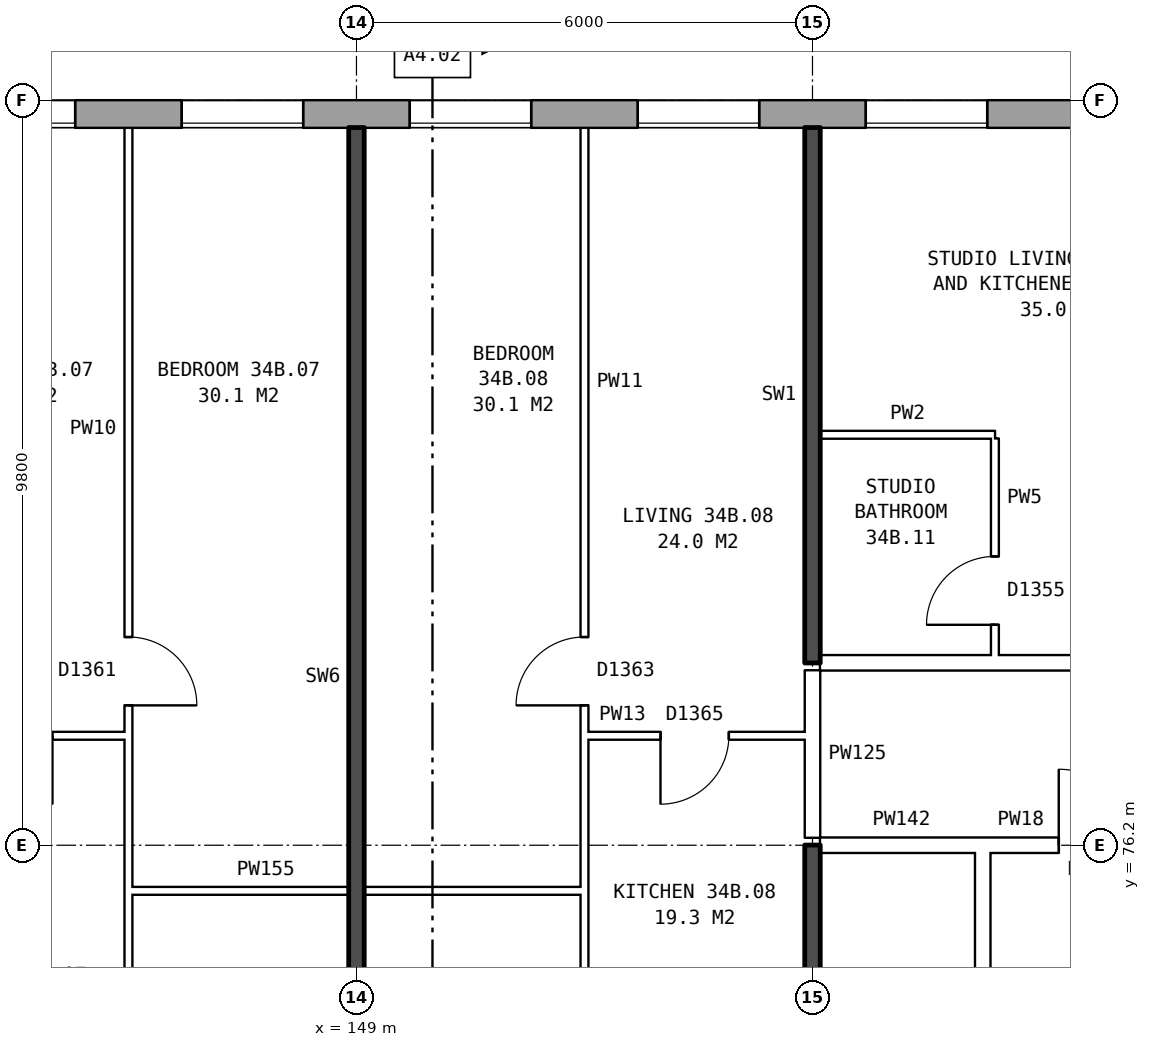
"""IFC4 building model, lengths in metres.
Left out: names, types, materials, properties, quantities, classifications, styles, units other than length and angle.
Written with IfcOpenShell. Run it as: python <this file> out.ifc"""

import sys

from ifc_helpers import new_model, si_unit, direction, frame, frame_2d, origin, place, context, subcontext, project, spatial, rectangle, extrude, element, fill, save


model = new_model("IFC4")
c1 = context("Model", 3, precision=1e-05, world=origin(), true_north=direction((0.0, 1.0)))
c2 = subcontext(c1, "Body", "Model", "MODEL_VIEW")
j1 = project(units=[si_unit("LENGTHUNIT", "METRE"), si_unit("PLANEANGLEUNIT", "RADIAN")], contexts=[c1])
p1 = place(None, origin())
s1 = spatial("IfcSite", under=j1, at=p1, CompositionType="ELEMENT")
p2 = place(p1, origin())
s2 = spatial("IfcBuilding", under=s1, at=p2, CompositionType="ELEMENT")
p3 = place(p2, frame((0.0, 0.0, 123.7)))
s3 = spatial("IfcBuildingStorey", under=s2, at=p3, CompositionType="ELEMENT", Elevation=123.7)
p4 = place(p3, frame((169.675, 85.82, 0.0), z_axis=(0.0, 0.0, 1.0), x_axis=(-1.0, 0.0, 0.0)))
e1 = element("IfcWall", 1, at=p4, inside=s3, PredefinedType="STANDARD", context=c2, shape_type="SweptSolid", body=[
    extrude(rectangle(XDim=35.601, YDim=0.36, at=frame_2d((17.8, 0.0))), origin(), (0.0, 0.0, 1.0), 2.85),
])
p5 = place(p4, frame((0.3, 0.0, 0.8)))
e2 = element("IfcOpeningElement", 2, at=p5, cuts=e1, PredefinedType="OPENING", context=c2, shape_type="SweptSolid", body=[
    extrude(rectangle(XDim=0.8, YDim=1.8, at=frame_2d((0.4, 0.9))), frame((0.0, 0.19, 0.0), z_axis=(0.0, -1.0, 0.0), x_axis=(1.0, 0.0, 0.0)), (0.0, 0.0, 1.0), 0.38),
])
p6 = place(p4, frame((3.125, 0.0, 0.8)))
e3 = element("IfcOpeningElement", 3, at=p6, cuts=e1, PredefinedType="OPENING", context=c2, shape_type="SweptSolid", body=[
    extrude(rectangle(XDim=0.8, YDim=0.9, at=frame_2d((0.4, 0.45))), frame((0.0, 0.19, 0.0), z_axis=(0.0, -1.0, 0.0), x_axis=(1.0, 0.0, 0.0)), (0.0, 0.0, 1.0), 0.38),
])
p7 = place(p4, frame((6.375, 0.0, 0.8)))
e4 = element("IfcOpeningElement", 4, at=p7, cuts=e1, PredefinedType="OPENING", context=c2, shape_type="SweptSolid", body=[
    extrude(rectangle(XDim=1.6, YDim=1.8, at=frame_2d((0.8, 0.9))), frame((0.0, 0.19, 0.0), z_axis=(0.0, -1.0, 0.0), x_axis=(1.0, 0.0, 0.0)), (0.0, 0.0, 1.0), 0.38),
])
p8 = place(p4, frame((9.375, 0.0, 0.8)))
e5 = element("IfcOpeningElement", 5, at=p8, cuts=e1, PredefinedType="OPENING", context=c2, shape_type="SweptSolid", body=[
    extrude(rectangle(XDim=1.6, YDim=1.8, at=frame_2d((0.8, 0.9))), frame((0.0, 0.19, 0.0), z_axis=(0.0, -1.0, 0.0), x_axis=(1.0, 0.0, 0.0)), (0.0, 0.0, 1.0), 0.38),
])
p9 = place(p4, frame((12.375, 0.0, 0.8)))
e6 = element("IfcOpeningElement", 6, at=p9, cuts=e1, PredefinedType="OPENING", context=c2, shape_type="SweptSolid", body=[
    extrude(rectangle(XDim=1.6, YDim=1.8, at=frame_2d((0.8, 0.9))), frame((0.0, 0.19, 0.0), z_axis=(0.0, -1.0, 0.0), x_axis=(1.0, 0.0, 0.0)), (0.0, 0.0, 1.0), 0.38),
])
p10 = place(p4, frame((15.375, 0.0, 0.8)))
e7 = element("IfcOpeningElement", 7, at=p10, cuts=e1, PredefinedType="OPENING", context=c2, shape_type="SweptSolid", body=[
    extrude(rectangle(XDim=1.6, YDim=1.8, at=frame_2d((0.8, 0.9))), frame((0.0, 0.19, 0.0), z_axis=(0.0, -1.0, 0.0), x_axis=(1.0, 0.0, 0.0)), (0.0, 0.0, 1.0), 0.38),
])
p11 = place(p4, frame((18.375, 0.0, 0.8)))
e8 = element("IfcOpeningElement", 8, at=p11, cuts=e1, PredefinedType="OPENING", context=c2, shape_type="SweptSolid", body=[
    extrude(rectangle(XDim=1.6, YDim=1.8, at=frame_2d((0.8, 0.9))), frame((0.0, 0.19, 0.0), z_axis=(0.0, -1.0, 0.0), x_axis=(1.0, 0.0, 0.0)), (0.0, 0.0, 1.0), 0.38),
])
p12 = place(p4, frame((21.375, 0.0, 0.8)))
e9 = element("IfcOpeningElement", 9, at=p12, cuts=e1, PredefinedType="OPENING", context=c2, shape_type="SweptSolid", body=[
    extrude(rectangle(XDim=1.6, YDim=1.8, at=frame_2d((0.8, 0.9))), frame((0.0, 0.19, 0.0), z_axis=(0.0, -1.0, 0.0), x_axis=(1.0, 0.0, 0.0)), (0.0, 0.0, 1.0), 0.38),
])
p13 = place(p4, frame((24.375, 0.0, 0.8)))
e10 = element("IfcOpeningElement", 10, at=p13, cuts=e1, PredefinedType="OPENING", context=c2, shape_type="SweptSolid", body=[
    extrude(rectangle(XDim=1.6, YDim=1.8, at=frame_2d((0.8, 0.9))), frame((0.0, 0.19, 0.0), z_axis=(0.0, -1.0, 0.0), x_axis=(1.0, 0.0, 0.0)), (0.0, 0.0, 1.0), 0.38),
])
p14 = place(p4, frame((27.375, 0.0, 0.8)))
e11 = element("IfcOpeningElement", 11, at=p14, cuts=e1, PredefinedType="OPENING", context=c2, shape_type="SweptSolid", body=[
    extrude(rectangle(XDim=1.6, YDim=1.8, at=frame_2d((0.8, 0.9))), frame((0.0, 0.19, 0.0), z_axis=(0.0, -1.0, 0.0), x_axis=(1.0, 0.0, 0.0)), (0.0, 0.0, 1.0), 0.38),
])
p15 = place(p4, frame((29.275, 0.0, 0.8)))
e12 = element("IfcOpeningElement", 12, at=p15, cuts=e1, PredefinedType="OPENING", context=c2, shape_type="SweptSolid", body=[
    extrude(rectangle(XDim=1.4, YDim=1.8, at=frame_2d((0.7, 0.9))), frame((0.0, 0.19, 0.0), z_axis=(0.0, -1.0, 0.0), x_axis=(1.0, 0.0, 0.0)), (0.0, 0.0, 1.0), 0.38),
])
p16 = place(p4, frame((33.525, 0.0, 1.7)))
e13 = element("IfcOpeningElement", 13, at=p16, cuts=e1, PredefinedType="OPENING", context=c2, shape_type="SweptSolid", body=[
    extrude(rectangle(XDim=0.6, YDim=0.9, at=frame_2d((0.3, 0.45))), frame((0.0, 0.19, 0.0), z_axis=(0.0, -1.0, 0.0), x_axis=(1.0, 0.0, 0.0)), (0.0, 0.0, 1.0), 0.38),
])
p17 = place(p4, frame((1.4, 0.0, 1.6)))
e14 = element("IfcOpeningElement", 14, at=p17, cuts=e1, PredefinedType="OPENING", context=c2, shape_type="SweptSolid", body=[
    extrude(rectangle(XDim=0.6, YDim=0.9, at=frame_2d((0.3, 0.45))), frame((0.0, 0.19, 0.0), z_axis=(0.0, -1.0, 0.0), x_axis=(1.0, 0.0, 0.0)), (0.0, 0.0, 1.0), 0.38),
])
p18 = place(p4, frame((4.225, 0.0, 0.8)))
e15 = element("IfcOpeningElement", 15, at=p18, cuts=e1, PredefinedType="OPENING", context=c2, shape_type="SweptSolid", body=[
    extrude(rectangle(XDim=1.6, YDim=1.8, at=frame_2d((0.8, 0.9))), frame((0.0, 0.19, 0.0), z_axis=(0.0, -1.0, 0.0), x_axis=(1.0, 0.0, 0.0)), (0.0, 0.0, 1.0), 0.38),
])
p19 = place(p4, frame((30.975, 0.0, 0.8)))
e16 = element("IfcOpeningElement", 16, at=p19, cuts=e1, PredefinedType="OPENING", context=c2, shape_type="SweptSolid", body=[
    extrude(rectangle(XDim=0.8, YDim=1.5, at=frame_2d((0.4, 0.75))), frame((0.0, 0.19, 0.0), z_axis=(0.0, -1.0, 0.0), x_axis=(1.0, 0.0, 0.0)), (0.0, 0.0, 1.0), 0.38),
])
p20 = place(p4, frame((34.425, 0.0, 0.8)))
e17 = element("IfcOpeningElement", 17, at=p20, cuts=e1, PredefinedType="OPENING", context=c2, shape_type="SweptSolid", body=[
    extrude(rectangle(XDim=0.8, YDim=1.8, at=frame_2d((0.4, 0.9))), frame((0.0, 0.19, 0.0), z_axis=(0.0, -1.0, 0.0), x_axis=(1.0, 0.0, 0.0)), (0.0, 0.0, 1.0), 0.38),
])
p21 = place(p3, frame((157.24, 63.9, 0.0), z_axis=(0.0, 0.0, 1.0), x_axis=(0.0, 1.0, 0.0)))
e18 = element("IfcWall", 18, at=p21, inside=s3, PredefinedType="PARTITIONING", context=c2, shape_type="SweptSolid", body=[
    extrude(rectangle(XDim=12.2, YDim=0.2, at=frame_2d((6.1, 0.0))), origin(), (0.0, 0.0, 1.0), 2.85),
])
p22 = place(p21, frame((5.1, 0.0, 0.0)))
e19 = element("IfcOpeningElement", 19, at=p22, cuts=e18, PredefinedType="OPENING", context=c2, shape_type="SweptSolid", body=[
    extrude(rectangle(XDim=2.0, YDim=2.1, at=frame_2d((1.0, 1.05))), frame((0.0, 0.11, 0.0), z_axis=(0.0, -1.0, 0.0), x_axis=(1.0, 0.0, 0.0)), (0.0, 0.0, 1.0), 0.22),
])
p23 = place(p3, frame((146.0, 75.6, 0.0), z_axis=(0.0, 0.0, 1.0), x_axis=(1.0, 0.0, 0.0)))
e20 = element("IfcWall", 20, at=p23, inside=s3, PredefinedType="PARTITIONING", context=c2, shape_type="SweptSolid", body=[
    extrude(rectangle(XDim=6.0, YDim=0.1, at=frame_2d((3.0, 0.0))), origin(), (0.0, 0.0, 1.0), 2.85),
])
p24 = place(p3, frame((155.1, 76.2, 0.0), z_axis=(0.0, 0.0, 1.0), x_axis=(1.0, 0.0, 0.0)))
e21 = element("IfcWall", 21, at=p24, inside=s3, PredefinedType="PARTITIONING", context=c2, shape_type="SweptSolid", body=[
    extrude(rectangle(XDim=2.14, YDim=0.2, at=frame_2d((1.07, 0.0))), origin(), (0.0, 0.0, 1.0), 2.85),
])
p25 = place(p3, frame((157.24, 76.2, 0.0), z_axis=(0.0, 0.0, 1.0), x_axis=(1.0, 0.0, 0.0)))
e22 = element("IfcWall", 22, at=p25, inside=s3, PredefinedType="PARTITIONING", context=c2, shape_type="SweptSolid", body=[
    extrude(rectangle(XDim=3.0, YDim=0.2, at=frame_2d((1.5, 0.0))), origin(), (0.0, 0.0, 1.0), 2.85),
])
p26 = place(p25, frame((1.0, 0.0, 0.0)))
e23 = element("IfcOpeningElement", 23, at=p26, cuts=e22, PredefinedType="OPENING", context=c2, shape_type="SweptSolid", body=[
    extrude(rectangle(XDim=1.0, YDim=2.1, at=frame_2d((0.5, 1.05))), frame((0.0, 0.11, 0.0), z_axis=(0.0, -1.0, 0.0), x_axis=(1.0, 0.0, 0.0)), (0.0, 0.0, 1.0), 0.22),
])
p27 = place(p3, frame((143.1, 77.64, 0.0), z_axis=(0.0, 0.0, 1.0), x_axis=(1.0, 0.0, 0.0)))
e24 = element("IfcWall", 24, at=p27, inside=s3, PredefinedType="PARTITIONING", context=c2, shape_type="SweptSolid", body=[
    extrude(rectangle(XDim=2.9, YDim=0.1, at=frame_2d((1.45, 0.0))), origin(), (0.0, 0.0, 1.0), 2.85),
])
p28 = place(p27, frame((1.0, 0.0, 0.0)))
e25 = element("IfcOpeningElement", 25, at=p28, cuts=e24, PredefinedType="OPENING", context=c2, shape_type="SweptSolid", body=[
    extrude(rectangle(XDim=0.9, YDim=2.1, at=frame_2d((0.45, 1.05))), frame((0.0, 0.06, 0.0), z_axis=(0.0, -1.0, 0.0), x_axis=(1.0, 0.0, 0.0)), (0.0, 0.0, 1.0), 0.12),
])
p29 = place(p3, frame((152.0, 77.64, 0.0), z_axis=(0.0, 0.0, 1.0), x_axis=(1.0, 0.0, 0.0)))
e26 = element("IfcWall", 26, at=p29, inside=s3, PredefinedType="PARTITIONING", context=c2, shape_type="SweptSolid", body=[
    extrude(rectangle(XDim=2.9, YDim=0.1, at=frame_2d((1.45, 0.0))), origin(), (0.0, 0.0, 1.0), 2.85),
])
p30 = place(p29, frame((1.0, 0.0, 0.0)))
e27 = element("IfcOpeningElement", 27, at=p30, cuts=e26, PredefinedType="OPENING", context=c2, shape_type="SweptSolid", body=[
    extrude(rectangle(XDim=0.9, YDim=2.1, at=frame_2d((0.45, 1.05))), frame((0.0, 0.06, 0.0), z_axis=(0.0, -1.0, 0.0), x_axis=(1.0, 0.0, 0.0)), (0.0, 0.0, 1.0), 0.12),
])
p31 = place(p3, frame((155.1, 78.6, 0.0), z_axis=(0.0, 0.0, 1.0), x_axis=(1.0, 0.0, 0.0)))
e28 = element("IfcWall", 28, at=p31, inside=s3, PredefinedType="PARTITIONING", context=c2, shape_type="SweptSolid", body=[
    extrude(rectangle(XDim=17.29, YDim=0.2, at=frame_2d((8.645, 0.0))), origin(), (0.0, 0.0, 1.0), 2.85),
])
p32 = place(p31, frame((3.6, 0.0, 0.0)))
e29 = element("IfcOpeningElement", 29, at=p32, cuts=e28, PredefinedType="OPENING", context=c2, shape_type="SweptSolid", body=[
    extrude(rectangle(XDim=1.0, YDim=2.1, at=frame_2d((0.5, 1.05))), frame((0.0, 0.11, 0.0), z_axis=(0.0, -1.0, 0.0), x_axis=(1.0, 0.0, 0.0)), (0.0, 0.0, 1.0), 0.22),
])
p33 = place(p31, frame((8.4, 0.0, 0.0)))
e30 = element("IfcOpeningElement", 30, at=p33, cuts=e28, PredefinedType="OPENING", context=c2, shape_type="SweptSolid", body=[
    extrude(rectangle(XDim=1.0, YDim=2.1, at=frame_2d((0.5, 1.05))), frame((0.0, 0.11, 0.0), z_axis=(0.0, -1.0, 0.0), x_axis=(1.0, 0.0, 0.0)), (0.0, 0.0, 1.0), 0.22),
])
p34 = place(p3, frame((155.1, 81.6, 0.0), z_axis=(0.0, 0.0, 1.0), x_axis=(1.0, 0.0, 0.0)))
e31 = element("IfcWall", 31, at=p34, inside=s3, PredefinedType="PARTITIONING", context=c2, shape_type="SweptSolid", body=[
    extrude(rectangle(XDim=2.3, YDim=0.1, at=frame_2d((1.15, 0.0))), origin(), (0.0, 0.0, 1.0), 2.85),
])
p35 = place(p3, frame((146.0, 71.3, 0.0), z_axis=(0.0, 0.0, 1.0), x_axis=(0.0, 1.0, 0.0)))
e32 = element("IfcWall", 32, at=p35, inside=s3, PredefinedType="PARTITIONING", context=c2, shape_type="SweptSolid", body=[
    extrude(rectangle(XDim=14.34, YDim=0.1, at=frame_2d((7.17, 0.0))), origin(), (0.0, 0.0, 1.0), 2.85),
])
p36 = place(p35, frame((6.74, 0.0, 0.0)))
e33 = element("IfcOpeningElement", 33, at=p36, cuts=e32, PredefinedType="OPENING", context=c2, shape_type="SweptSolid", body=[
    extrude(rectangle(XDim=0.9, YDim=2.1, at=frame_2d((0.45, 1.05))), frame((0.0, 0.06, 0.0), z_axis=(0.0, -1.0, 0.0), x_axis=(1.0, 0.0, 0.0)), (0.0, 0.0, 1.0), 0.12),
])
p37 = place(p35, frame((0.4, 0.0, 0.0)))
e34 = element("IfcOpeningElement", 34, at=p37, cuts=e32, PredefinedType="OPENING", context=c2, shape_type="SweptSolid", body=[
    extrude(rectangle(XDim=0.9, YDim=2.1, at=frame_2d((0.45, 1.05))), frame((0.0, 0.06, 0.0), z_axis=(0.0, -1.0, 0.0), x_axis=(1.0, 0.0, 0.0)), (0.0, 0.0, 1.0), 0.12),
])
p38 = place(p3, frame((149.0, 71.2, 0.0), z_axis=(0.0, 0.0, 1.0), x_axis=(0.0, 1.0, 0.0)))
e35 = element("IfcWall", 35, at=p38, inside=s3, PredefinedType="SOLIDWALL", context=c2, shape_type="SweptSolid", body=[
    extrude(rectangle(XDim=14.44, YDim=0.2, at=frame_2d((7.22, 0.0))), origin(), (0.0, 0.0, 1.0), 2.85),
])
p39 = place(p3, frame((152.0, 71.3, 0.0), z_axis=(0.0, 0.0, 1.0), x_axis=(0.0, 1.0, 0.0)))
e36 = element("IfcWall", 36, at=p39, inside=s3, PredefinedType="PARTITIONING", context=c2, shape_type="SweptSolid", body=[
    extrude(rectangle(XDim=14.34, YDim=0.1, at=frame_2d((7.17, 0.0))), origin(), (0.0, 0.0, 1.0), 2.85),
])
p40 = place(p39, frame((6.74, 0.0, 0.0)))
e37 = element("IfcOpeningElement", 37, at=p40, cuts=e36, PredefinedType="OPENING", context=c2, shape_type="SweptSolid", body=[
    extrude(rectangle(XDim=0.9, YDim=2.1, at=frame_2d((0.45, 1.05))), frame((0.0, 0.06, 0.0), z_axis=(0.0, -1.0, 0.0), x_axis=(1.0, 0.0, 0.0)), (0.0, 0.0, 1.0), 0.12),
])
p41 = place(p39, frame((0.4, 0.0, 0.0)))
e38 = element("IfcOpeningElement", 38, at=p41, cuts=e36, PredefinedType="OPENING", context=c2, shape_type="SweptSolid", body=[
    extrude(rectangle(XDim=0.9, YDim=2.1, at=frame_2d((0.45, 1.05))), frame((0.0, 0.06, 0.0), z_axis=(0.0, -1.0, 0.0), x_axis=(1.0, 0.0, 0.0)), (0.0, 0.0, 1.0), 0.12),
])
p42 = place(p3, frame((155.0, 71.2, 0.0), z_axis=(0.0, 0.0, 1.0), x_axis=(0.0, 1.0, 0.0)))
e39 = element("IfcWall", 39, at=p42, inside=s3, PredefinedType="SOLIDWALL", context=c2, shape_type="SweptSolid", body=[
    extrude(rectangle(XDim=5.0, YDim=0.2, at=frame_2d((2.5, 0.0))), origin(), (0.0, 0.0, 1.0), 2.85),
])
p43 = place(p3, frame((155.0, 76.3, 0.0), z_axis=(0.0, 0.0, 1.0), x_axis=(0.0, 1.0, 0.0)))
e40 = element("IfcWall", 40, at=p43, inside=s3, PredefinedType="PARTITIONING", context=c2, shape_type="SweptSolid", body=[
    extrude(rectangle(XDim=2.2, YDim=0.2, at=frame_2d((1.1, 0.0))), origin(), (0.0, 0.0, 1.0), 2.85),
])
p44 = place(p3, frame((155.0, 78.6, 0.0), z_axis=(0.0, 0.0, 1.0), x_axis=(0.0, 1.0, 0.0)))
e41 = element("IfcWall", 41, at=p44, inside=s3, PredefinedType="SOLIDWALL", context=c2, shape_type="SweptSolid", body=[
    extrude(rectangle(XDim=7.04, YDim=0.2, at=frame_2d((3.52, 0.0))), origin(), (0.0, 0.0, 1.0), 2.85),
])
p45 = place(p3, frame((157.4, 78.7, 0.0), z_axis=(0.0, 0.0, 1.0), x_axis=(0.0, 1.0, 0.0)))
e42 = element("IfcWall", 42, at=p45, inside=s3, PredefinedType="PARTITIONING", context=c2, shape_type="SweptSolid", body=[
    extrude(rectangle(XDim=2.85, YDim=0.1, at=frame_2d((1.425, 0.0))), origin(), (0.0, 0.0, 1.0), 2.85),
])
p46 = place(p45, frame((0.4, 0.0, 0.0)))
e43 = element("IfcOpeningElement", 43, at=p46, cuts=e42, PredefinedType="OPENING", context=c2, shape_type="SweptSolid", body=[
    extrude(rectangle(XDim=0.9, YDim=2.1, at=frame_2d((0.45, 1.05))), frame((0.0, 0.06, 0.0), z_axis=(0.0, -1.0, 0.0), x_axis=(1.0, 0.0, 0.0)), (0.0, 0.0, 1.0), 0.12),
])
p47 = place(p9, origin())
e44 = element("IfcWindow", 44, at=p47, inside=s3, PartitioningType="SINGLE_PANEL", PredefinedType="WINDOW", context=c2, shape_type="SweptSolid", body=[
    extrude(rectangle(XDim=1.6, YDim=1.8, at=frame_2d((0.8, 0.9))), frame((0.0, 0.15, 0.0), z_axis=(0.0, -1.0, 0.0), x_axis=(1.0, 0.0, 0.0)), (0.0, 0.0, 1.0), 0.06),
])
fill(e6, e44)
p48 = place(p10, origin())
e45 = element("IfcWindow", 45, at=p48, inside=s3, PartitioningType="SINGLE_PANEL", PredefinedType="WINDOW", context=c2, shape_type="SweptSolid", body=[
    extrude(rectangle(XDim=1.6, YDim=1.8, at=frame_2d((0.8, 0.9))), frame((0.0, 0.15, 0.0), z_axis=(0.0, -1.0, 0.0), x_axis=(1.0, 0.0, 0.0)), (0.0, 0.0, 1.0), 0.06),
])
fill(e7, e45)
p49 = place(p11, origin())
e46 = element("IfcWindow", 46, at=p49, inside=s3, PartitioningType="SINGLE_PANEL", PredefinedType="WINDOW", context=c2, shape_type="SweptSolid", body=[
    extrude(rectangle(XDim=1.6, YDim=1.8, at=frame_2d((0.8, 0.9))), frame((0.0, 0.15, 0.0), z_axis=(0.0, -1.0, 0.0), x_axis=(1.0, 0.0, 0.0)), (0.0, 0.0, 1.0), 0.06),
])
fill(e8, e46)
p50 = place(p12, origin())
e47 = element("IfcWindow", 47, at=p50, inside=s3, PartitioningType="SINGLE_PANEL", PredefinedType="WINDOW", context=c2, shape_type="SweptSolid", body=[
    extrude(rectangle(XDim=1.6, YDim=1.8, at=frame_2d((0.8, 0.9))), frame((0.0, 0.15, 0.0), z_axis=(0.0, -1.0, 0.0), x_axis=(1.0, 0.0, 0.0)), (0.0, 0.0, 1.0), 0.06),
])
fill(e9, e47)
p51 = place(p13, origin())
e48 = element("IfcWindow", 48, at=p51, inside=s3, PartitioningType="SINGLE_PANEL", PredefinedType="WINDOW", context=c2, shape_type="SweptSolid", body=[
    extrude(rectangle(XDim=1.6, YDim=1.8, at=frame_2d((0.8, 0.9))), frame((0.0, 0.15, 0.0), z_axis=(0.0, -1.0, 0.0), x_axis=(1.0, 0.0, 0.0)), (0.0, 0.0, 1.0), 0.06),
])
fill(e10, e48)
p52 = place(p26, origin())
e49 = element("IfcDoor", 49, at=p52, inside=s3, OperationType="SINGLE_SWING_LEFT", PredefinedType="DOOR", context=c2, shape_type="SweptSolid", body=[
    extrude(rectangle(XDim=1.0, YDim=2.1, at=frame_2d((0.5, 1.05))), frame((0.0, 0.025, 0.0), z_axis=(0.0, -1.0, 0.0), x_axis=(1.0, 0.0, 0.0)), (0.0, 0.0, 1.0), 0.05),
])
fill(e23, e49)
p53 = place(p36, frame((0.9, 0.0, 0.0), z_axis=(0.0, 0.0, 1.0), x_axis=(-1.0, 0.0, 0.0)))
e50 = element("IfcDoor", 50, at=p53, inside=s3, OperationType="SINGLE_SWING_RIGHT", PredefinedType="DOOR", context=c2, shape_type="SweptSolid", body=[
    extrude(rectangle(XDim=0.9, YDim=2.1, at=frame_2d((0.45, 1.05))), frame((0.0, 0.025, 0.0), z_axis=(0.0, -1.0, 0.0), x_axis=(1.0, 0.0, 0.0)), (0.0, 0.0, 1.0), 0.05),
])
fill(e33, e50)
p54 = place(p40, origin())
e51 = element("IfcDoor", 51, at=p54, inside=s3, OperationType="SINGLE_SWING_LEFT", PredefinedType="DOOR", context=c2, shape_type="SweptSolid", body=[
    extrude(rectangle(XDim=0.9, YDim=2.1, at=frame_2d((0.45, 1.05))), frame((0.0, 0.025, 0.0), z_axis=(0.0, -1.0, 0.0), x_axis=(1.0, 0.0, 0.0)), (0.0, 0.0, 1.0), 0.05),
])
fill(e37, e51)
p55 = place(p30, frame((0.9, 0.0, 0.0), z_axis=(0.0, 0.0, 1.0), x_axis=(-1.0, 0.0, 0.0)))
e52 = element("IfcDoor", 52, at=p55, inside=s3, OperationType="SINGLE_SWING_RIGHT", PredefinedType="DOOR", context=c2, shape_type="SweptSolid", body=[
    extrude(rectangle(XDim=0.9, YDim=2.1, at=frame_2d((0.45, 1.05))), frame((0.0, 0.025, 0.0), z_axis=(0.0, -1.0, 0.0), x_axis=(1.0, 0.0, 0.0)), (0.0, 0.0, 1.0), 0.05),
])
fill(e27, e52)
p56 = place(p46, origin())
e53 = element("IfcDoor", 53, at=p56, inside=s3, OperationType="SINGLE_SWING_LEFT", PredefinedType="DOOR", context=c2, shape_type="SweptSolid", body=[
    extrude(rectangle(XDim=0.9, YDim=2.1, at=frame_2d((0.45, 1.05))), frame((0.0, 0.025, 0.0), z_axis=(0.0, -1.0, 0.0), x_axis=(1.0, 0.0, 0.0)), (0.0, 0.0, 1.0), 0.05),
])
fill(e43, e53)
save(model, sys.argv[1])
